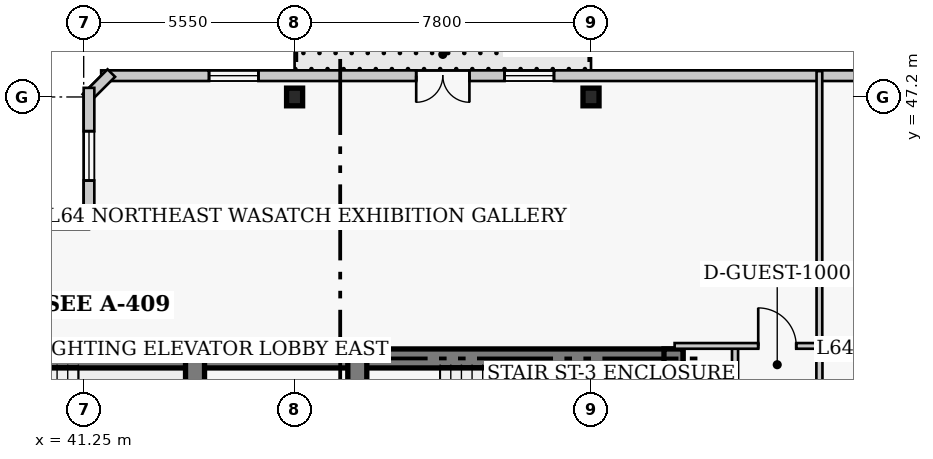
"""IFC4 building model, lengths in metres.
Left out: names, types, materials, properties, quantities, classifications, styles, units other than length and angle.
Written with IfcOpenShell. Run it as: python <this file> out.ifc"""

import sys

from ifc_helpers import new_model, si_unit, direction, frame, frame_2d, origin, origin_2d, place, context, subcontext, project, spatial, rectangle, i_section, extrude, element, fill, save


model = new_model("IFC4")
c1 = context("Model", 3, precision=1e-05, world=origin(), true_north=direction((0.0, 1.0)))
c2 = subcontext(c1, "Body", "Model", "MODEL_VIEW")
j1 = project(units=[si_unit("LENGTHUNIT", "METRE"), si_unit("PLANEANGLEUNIT", "RADIAN")], contexts=[c1])
p1 = place(None, origin())
s1 = spatial("IfcSite", under=j1, at=p1, CompositionType="ELEMENT")
p2 = place(p1, origin())
s2 = spatial("IfcBuilding", under=s1, at=p2, CompositionType="ELEMENT")
p3 = place(p2, frame((0.0, 0.0, 257.4)))
s3 = spatial("IfcBuildingStorey", under=s2, at=p3, CompositionType="ELEMENT", Elevation=257.4)
p4 = place(p3, frame((35.85, 40.32, 0.0), z_axis=(0.0, 0.0, 1.0), x_axis=(1.0, 0.0, 0.0)))
e1 = element("IfcWall", 1, at=p4, inside=s3, PredefinedType="SHEAR", context=c2, shape_type="SweptSolid", body=[
    extrude(rectangle(XDim=12.6, YDim=0.5, at=frame_2d((6.3, 0.0))), origin(), (0.0, 0.0, 1.0), 4.0),
])
p5 = place(p3, frame((48.45, 40.32, 0.0), z_axis=(0.0, 0.0, 1.0), x_axis=(1.0, 0.0, 0.0)))
e2 = element("IfcWall", 2, at=p5, inside=s3, PredefinedType="SHEAR", context=c2, shape_type="SweptSolid", body=[
    extrude(rectangle(XDim=8.57, YDim=0.5, at=frame_2d((4.285, 0.0))), origin(), (0.0, 0.0, 1.0), 4.0),
])
p6 = place(p3, frame((56.77, 27.05, 0.0), z_axis=(0.0, 0.0, 1.0), x_axis=(0.0, 1.0, 0.0)))
e3 = element("IfcWall", 3, at=p6, inside=s3, PredefinedType="SHEAR", context=c2, shape_type="SweptSolid", body=[
    extrude(rectangle(XDim=13.52, YDim=0.5, at=frame_2d((6.76, 0.0))), origin(), (0.0, 0.0, 1.0), 4.0),
])
p7 = place(p3, frame((44.18, 36.37, 0.0), z_axis=(0.0, 0.0, 1.0), x_axis=(0.0, 1.0, 0.0)))
e4 = element("IfcWall", 4, at=p7, inside=s3, PredefinedType="SHEAR", context=c2, shape_type="SweptSolid", body=[
    extrude(rectangle(XDim=3.95, YDim=0.5, at=frame_2d((1.975, 0.0))), origin(), (0.0, 0.0, 1.0), 4.0),
])
p8 = place(p3, frame((48.45, 32.5, 0.0), z_axis=(0.0, 0.0, 1.0), x_axis=(0.0, 1.0, 0.0)))
e5 = element("IfcWall", 5, at=p8, inside=s3, PredefinedType="SHEAR", context=c2, shape_type="SweptSolid", body=[
    extrude(rectangle(XDim=7.82, YDim=0.5, at=frame_2d((3.91, 0.0))), origin(), (0.0, 0.0, 1.0), 4.0),
])
p9 = place(p8, frame((5.7, 0.0, 0.0)))
e6 = element("IfcOpeningElement", 6, at=p9, cuts=e5, PredefinedType="OPENING", context=c2, shape_type="SweptSolid", body=[
    extrude(rectangle(XDim=1.1, YDim=2.15, at=frame_2d((0.55, 1.075))), frame((0.0, 0.26, 0.0), z_axis=(0.0, -1.0, 0.0), x_axis=(1.0, 0.0, 0.0)), (0.0, 0.0, 1.0), 0.52),
])
for number, where, z_axis, x_axis in (
    (7, (46.8, 47.2, 0.0), (0.0, 0.0, 1.0), (1.0, 0.0, 0.0)),
    (8, (54.6, 47.2, 0.0), (0.0, 0.0, 1.0), (1.0, 0.0, 0.0)),
):
    element("IfcColumn", number, at=place(p3, frame(where, z_axis=z_axis, x_axis=x_axis)), inside=s3, PredefinedType="COLUMN", context=c2, shape_type="SweptSolid", body=[
        extrude(i_section(OverallWidth=0.422, OverallDepth=0.465, WebThickness=0.045, FlangeThickness=0.073, FilletRadius=0.017, at=origin_2d()), origin(), (0.0, 0.0, 1.0), 4.0),
    ])
p10 = place(p3, frame((66.54, 47.76, 0.0), z_axis=(0.0, 0.0, 1.0), x_axis=(-1.0, 0.0, 0.0)))
e9 = element("IfcWall", 9, at=p10, inside=s3, PredefinedType="SOLIDWALL", context=c2, shape_type="SweptSolid", body=[
    extrude(rectangle(XDim=24.83, YDim=0.28, at=frame_2d((12.415, 0.0))), origin(), (0.0, 0.0, 1.0), 3.76),
])
p11 = place(p10, frame((15.14, 0.0, 0.0)))
e10 = element("IfcOpeningElement", 10, at=p11, cuts=e9, PredefinedType="OPENING", context=c2, shape_type="SweptSolid", body=[
    extrude(rectangle(XDim=1.4, YDim=2.15, at=frame_2d((0.7, 1.075))), frame((0.0, 0.15, 0.0), z_axis=(0.0, -1.0, 0.0), x_axis=(1.0, 0.0, 0.0)), (0.0, 0.0, 1.0), 0.3),
])
p12 = place(p10, frame((3.488, 0.0, 0.85)))
e11 = element("IfcOpeningElement", 11, at=p12, cuts=e9, PredefinedType="OPENING", context=c2, shape_type="SweptSolid", body=[
    extrude(rectangle(XDim=1.3, YDim=1.7, at=frame_2d((0.65, 0.85))), frame((0.0, 0.15, 0.0), z_axis=(0.0, -1.0, 0.0), x_axis=(1.0, 0.0, 0.0)), (0.0, 0.0, 1.0), 0.3),
])
p13 = place(p10, frame((12.915, 0.0, 0.85)))
e12 = element("IfcOpeningElement", 12, at=p13, cuts=e9, PredefinedType="OPENING", context=c2, shape_type="SweptSolid", body=[
    extrude(rectangle(XDim=1.3, YDim=1.7, at=frame_2d((0.65, 0.85))), frame((0.0, 0.15, 0.0), z_axis=(0.0, -1.0, 0.0), x_axis=(1.0, 0.0, 0.0)), (0.0, 0.0, 1.0), 0.3),
])
p14 = place(p10, frame((20.692, 0.0, 0.85)))
e13 = element("IfcOpeningElement", 13, at=p14, cuts=e9, PredefinedType="OPENING", context=c2, shape_type="SweptSolid", body=[
    extrude(rectangle(XDim=1.3, YDim=1.7, at=frame_2d((0.65, 0.85))), frame((0.0, 0.15, 0.0), z_axis=(0.0, -1.0, 0.0), x_axis=(1.0, 0.0, 0.0)), (0.0, 0.0, 1.0), 0.3),
])
p15 = place(p3, frame((41.977, 47.829, 0.0), z_axis=(0.0, 0.0, 1.0), x_axis=(-0.706975312048, -0.707238225886, 0.0)))
e14 = element("IfcWall", 14, at=p15, inside=s3, PredefinedType="SOLIDWALL", context=c2, shape_type="SweptSolid", body=[
    extrude(rectangle(XDim=0.929, YDim=0.28, at=frame_2d((0.464, 0.0))), origin(), (0.0, 0.0, 1.0), 3.76),
])
p16 = place(p3, frame((41.39, 47.44, 0.0), z_axis=(0.0, 0.0, 1.0), x_axis=(0.0, -1.0, 0.0)))
e15 = element("IfcWall", 15, at=p16, inside=s3, PredefinedType="SOLIDWALL", context=c2, shape_type="SweptSolid", body=[
    extrude(rectangle(XDim=3.58, YDim=0.28, at=frame_2d((1.79, 0.0))), origin(), (0.0, 0.0, 1.0), 3.76),
])
p17 = place(p16, frame((1.14, 0.0, 0.85)))
e16 = element("IfcOpeningElement", 16, at=p17, cuts=e15, PredefinedType="OPENING", context=c2, shape_type="SweptSolid", body=[
    extrude(rectangle(XDim=1.3, YDim=1.7, at=frame_2d((0.65, 0.85))), frame((0.0, 0.15, 0.0), z_axis=(0.0, -1.0, 0.0), x_axis=(1.0, 0.0, 0.0)), (0.0, 0.0, 1.0), 0.3),
])
p18 = place(p3, frame((41.39, 43.86, 0.0), z_axis=(0.0, 0.0, 1.0), x_axis=(-1.0, 0.0, 0.0)))
e17 = element("IfcWall", 17, at=p18, inside=s3, PredefinedType="SOLIDWALL", context=c2, shape_type="SweptSolid", body=[
    extrude(rectangle(XDim=4.78, YDim=0.28, at=frame_2d((2.39, 0.0))), origin(), (0.0, 0.0, 1.0), 3.76),
])
p19 = place(p18, frame((1.74, 0.0, 0.85)))
e18 = element("IfcOpeningElement", 18, at=p19, cuts=e17, PredefinedType="OPENING", context=c2, shape_type="SweptSolid", body=[
    extrude(rectangle(XDim=1.3, YDim=1.7, at=frame_2d((0.65, 0.85))), frame((0.0, 0.15, 0.0), z_axis=(0.0, -1.0, 0.0), x_axis=(1.0, 0.0, 0.0)), (0.0, 0.0, 1.0), 0.3),
])
p20 = place(p3, frame((60.61, 24.25, 0.0), z_axis=(0.0, 0.0, 1.0), x_axis=(0.0, 1.0, 0.0)))
e19 = element("IfcWall", 19, at=p20, inside=s3, PredefinedType="PARTITIONING", context=c2, shape_type="SweptSolid", body=[
    extrude(rectangle(XDim=16.4, YDim=0.16, at=frame_2d((8.2, 0.0))), origin(), (0.0, 0.0, 1.0), 3.76),
])
p21 = place(p20, frame((0.46, 0.0, 0.0)))
e20 = element("IfcOpeningElement", 20, at=p21, cuts=e19, PredefinedType="OPENING", context=c2, shape_type="SweptSolid", body=[
    extrude(rectangle(XDim=0.95, YDim=2.1, at=frame_2d((0.475, 1.05))), frame((0.0, 0.09, 0.0), z_axis=(0.0, -1.0, 0.0), x_axis=(1.0, 0.0, 0.0)), (0.0, 0.0, 1.0), 0.18),
])
p22 = place(p20, frame((11.9, 0.0, 0.0)))
e21 = element("IfcOpeningElement", 21, at=p22, cuts=e19, PredefinedType="OPENING", context=c2, shape_type="SweptSolid", body=[
    extrude(rectangle(XDim=1.0, YDim=2.15, at=frame_2d((0.5, 1.075))), frame((0.0, 0.09, 0.0), z_axis=(0.0, -1.0, 0.0), x_axis=(1.0, 0.0, 0.0)), (0.0, 0.0, 1.0), 0.18),
])
p23 = place(p3, frame((58.39, 26.41, 0.0), z_axis=(0.0, 0.0, 1.0), x_axis=(0.0, 1.0, 0.0)))
e22 = element("IfcWall", 22, at=p23, inside=s3, PredefinedType="PARTITIONING", context=c2, shape_type="SweptSolid", body=[
    extrude(rectangle(XDim=14.24, YDim=0.16, at=frame_2d((7.12, 0.0))), origin(), (0.0, 0.0, 1.0), 3.76),
])
p24 = place(p3, frame((56.8, 40.65, 0.0), z_axis=(0.0, 0.0, 1.0), x_axis=(1.0, 0.0, 0.0)))
e23 = element("IfcWall", 23, at=p24, inside=s3, PredefinedType="PARTITIONING", context=c2, shape_type="SweptSolid", body=[
    extrude(rectangle(XDim=3.81, YDim=0.15, at=frame_2d((1.905, 0.0))), origin(), (0.0, 0.0, 1.0), 3.76),
])
p25 = place(p24, frame((2.2, 0.0, 0.0)))
e24 = element("IfcOpeningElement", 24, at=p25, cuts=e23, PredefinedType="OPENING", context=c2, shape_type="SweptSolid", body=[
    extrude(rectangle(XDim=1.0, YDim=2.15, at=frame_2d((0.5, 1.075))), frame((0.0, 0.085, 0.0), z_axis=(0.0, -1.0, 0.0), x_axis=(1.0, 0.0, 0.0)), (0.0, 0.0, 1.0), 0.17),
])
p26 = place(p3, frame((60.61, 40.65, 0.0), z_axis=(0.0, 0.0, 1.0), x_axis=(0.0, 1.0, 0.0)))
e25 = element("IfcWall", 25, at=p26, inside=s3, PredefinedType="PARTITIONING", context=c2, shape_type="SweptSolid", body=[
    extrude(rectangle(XDim=7.23, YDim=0.15, at=frame_2d((3.615, 0.0))), origin(), (0.0, 0.0, 1.0), 3.76),
])
p27 = place(p11, origin())
e26 = element("IfcDoor", 26, at=p27, inside=s3, OperationType="DOUBLE_DOOR_SINGLE_SWING", PredefinedType="DOOR", context=c2, shape_type="SweptSolid", body=[
    extrude(rectangle(XDim=1.4, YDim=2.15, at=frame_2d((0.7, 1.075))), frame((0.0, 0.025, 0.0), z_axis=(0.0, -1.0, 0.0), x_axis=(1.0, 0.0, 0.0)), (0.0, 0.0, 1.0), 0.05),
])
fill(e10, e26)
p28 = place(p13, origin())
e27 = element("IfcWindow", 27, at=p28, inside=s3, PartitioningType="SINGLE_PANEL", PredefinedType="WINDOW", context=c2, shape_type="SweptSolid", body=[
    extrude(rectangle(XDim=1.3, YDim=1.7, at=frame_2d((0.65, 0.85))), frame((0.0, 0.03, 0.0), z_axis=(0.0, -1.0, 0.0), x_axis=(1.0, 0.0, 0.0)), (0.0, 0.0, 1.0), 0.06),
])
fill(e12, e27)
p29 = place(p14, origin())
e28 = element("IfcWindow", 28, at=p29, inside=s3, PartitioningType="SINGLE_PANEL", PredefinedType="WINDOW", context=c2, shape_type="SweptSolid", body=[
    extrude(rectangle(XDim=1.3, YDim=1.7, at=frame_2d((0.65, 0.85))), frame((0.0, 0.03, 0.0), z_axis=(0.0, -1.0, 0.0), x_axis=(1.0, 0.0, 0.0)), (0.0, 0.0, 1.0), 0.06),
])
fill(e13, e28)
p30 = place(p17, origin())
e29 = element("IfcWindow", 29, at=p30, inside=s3, PartitioningType="SINGLE_PANEL", PredefinedType="WINDOW", context=c2, shape_type="SweptSolid", body=[
    extrude(rectangle(XDim=1.3, YDim=1.7, at=frame_2d((0.65, 0.85))), frame((0.0, 0.03, 0.0), z_axis=(0.0, -1.0, 0.0), x_axis=(1.0, 0.0, 0.0)), (0.0, 0.0, 1.0), 0.06),
])
fill(e16, e29)
p31 = place(p25, origin())
e30 = element("IfcDoor", 30, at=p31, inside=s3, OperationType="SINGLE_SWING_LEFT", PredefinedType="DOOR", context=c2, shape_type="SweptSolid", body=[
    extrude(rectangle(XDim=1.0, YDim=2.15, at=frame_2d((0.5, 1.075))), frame((0.0, 0.025, 0.0), z_axis=(0.0, -1.0, 0.0), x_axis=(1.0, 0.0, 0.0)), (0.0, 0.0, 1.0), 0.05),
])
fill(e24, e30)
save(model, sys.argv[1])
